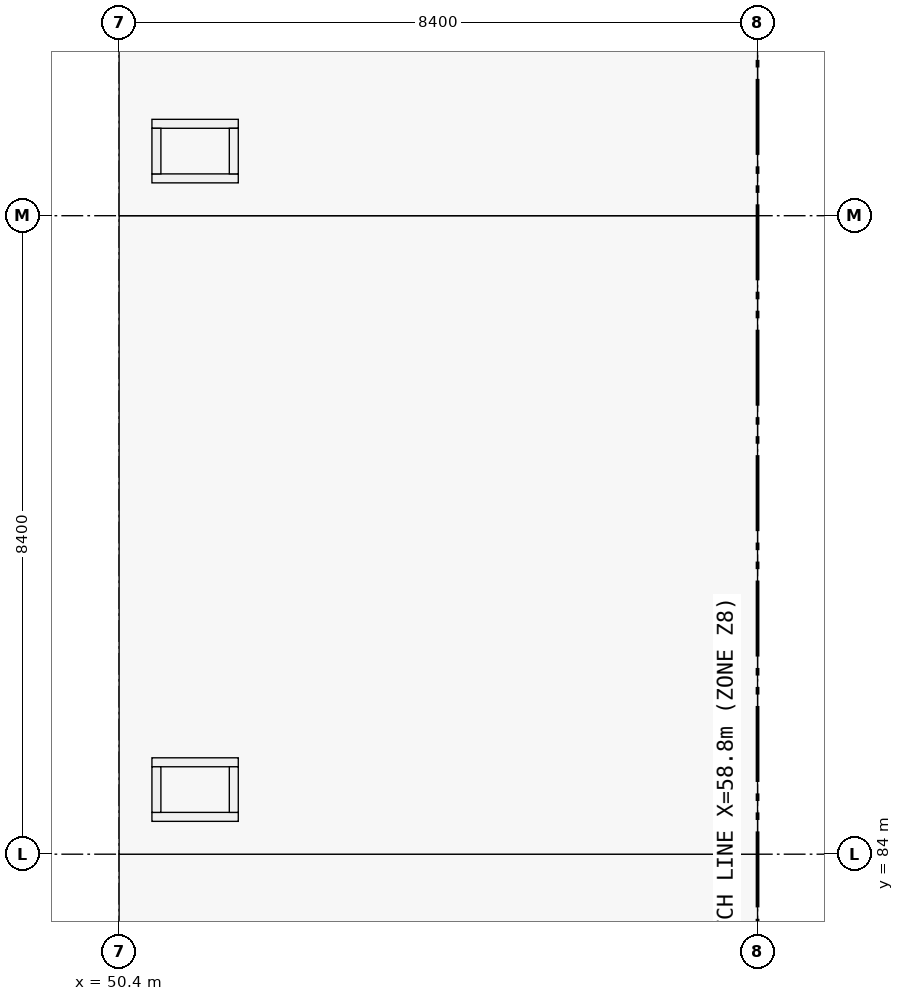
"""IFC4 building model, lengths in metres.
Left out: names, types, materials, properties, quantities, classifications, styles, units other than length and angle.
Written with IfcOpenShell. Run it as: python <this file> out.ifc"""

import sys

from ifc_helpers import new_model, si_unit, direction, frame, frame_2d, origin, origin_2d, place, context, subcontext, project, spatial, rectangle, extrude, element, save


model = new_model("IFC4")
c1 = context("Model", 3, precision=1e-05, world=origin(), true_north=direction((0.0, 1.0)))
c2 = subcontext(c1, "Body", "Model", "MODEL_VIEW")
j1 = project(units=[si_unit("LENGTHUNIT", "METRE"), si_unit("PLANEANGLEUNIT", "RADIAN")], contexts=[c1])
p1 = place(None, origin())
s1 = spatial("IfcSite", under=j1, at=p1, CompositionType="ELEMENT")
p2 = place(p1, origin())
s2 = spatial("IfcBuilding", under=s1, at=p2, CompositionType="ELEMENT")
p3 = place(p2, frame((0.0, 0.0, 5.76)))
s3 = spatial("IfcBuildingStorey", under=s2, at=p3, CompositionType="ELEMENT", Elevation=5.76)
for number, where, z_axis, x_axis in (
    (1, (50.4, 84.0, 0.0), (0.0, 0.0, 1.0), (1.0, 0.0, 0.0)),
    (2, (50.4, 92.4, 0.0), (0.0, 0.0, 1.0), (1.0, 0.0, 0.0)),
    (3, (58.8, 84.0, 0.0), (0.0, 0.0, 1.0), (1.0, 0.0, 0.0)),
    (4, (58.8, 92.4, 0.0), (0.0, 0.0, 1.0), (1.0, 0.0, 0.0)),
):
    element("IfcColumn", number, at=place(p3, frame(where, z_axis=z_axis, x_axis=x_axis)), inside=s3, PredefinedType="COLUMN", context=c2, shape_type="SweptSolid", body=[
        extrude(rectangle(XDim=0.8, YDim=0.8, at=origin_2d()), origin(), (0.0, 0.0, 1.0), 4.5),
    ])
for number, where, z_axis, x_axis in (
    (5, (50.832, 84.491, 0.0), (0.0, 0.0, 1.0), (1.0, 0.0, 0.0)),
    (6, (50.832, 85.209, 0.0), (0.0, 0.0, 1.0), (1.0, 0.0, 0.0)),
):
    element("IfcWall", number, at=place(p3, frame(where, z_axis=z_axis, x_axis=x_axis)), inside=s3, PredefinedType="PARTITIONING", context=c2, shape_type="SweptSolid", body=[
        extrude(rectangle(XDim=1.136, YDim=0.118, at=frame_2d((0.568, 0.0))), origin(), (0.0, 0.0, 1.0), 3.48),
    ])
for number, where, z_axis, x_axis in (
    (7, (50.891, 84.55, 0.0), (0.0, 0.0, 1.0), (0.0, 1.0, 0.0)),
    (8, (51.909, 84.55, 0.0), (0.0, 0.0, 1.0), (0.0, 1.0, 0.0)),
):
    element("IfcWall", number, at=place(p3, frame(where, z_axis=z_axis, x_axis=x_axis)), inside=s3, PredefinedType="PARTITIONING", context=c2, shape_type="SweptSolid", body=[
        extrude(rectangle(XDim=0.6, YDim=0.118, at=frame_2d((0.3, 0.0))), origin(), (0.0, 0.0, 1.0), 3.48),
    ])
for number, where, z_axis, x_axis in (
    (9, (50.832, 92.891, 0.0), (0.0, 0.0, 1.0), (1.0, 0.0, 0.0)),
    (10, (50.832, 93.609, 0.0), (0.0, 0.0, 1.0), (1.0, 0.0, 0.0)),
):
    element("IfcWall", number, at=place(p3, frame(where, z_axis=z_axis, x_axis=x_axis)), inside=s3, PredefinedType="PARTITIONING", context=c2, shape_type="SweptSolid", body=[
        extrude(rectangle(XDim=1.136, YDim=0.118, at=frame_2d((0.568, 0.0))), origin(), (0.0, 0.0, 1.0), 3.48),
    ])
for number, where, z_axis, x_axis in (
    (11, (50.891, 92.95, 0.0), (0.0, 0.0, 1.0), (0.0, 1.0, 0.0)),
    (12, (51.909, 92.95, 0.0), (0.0, 0.0, 1.0), (0.0, 1.0, 0.0)),
):
    element("IfcWall", number, at=place(p3, frame(where, z_axis=z_axis, x_axis=x_axis)), inside=s3, PredefinedType="PARTITIONING", context=c2, shape_type="SweptSolid", body=[
        extrude(rectangle(XDim=0.6, YDim=0.118, at=frame_2d((0.3, 0.0))), origin(), (0.0, 0.0, 1.0), 3.48),
    ])
save(model, sys.argv[1])
